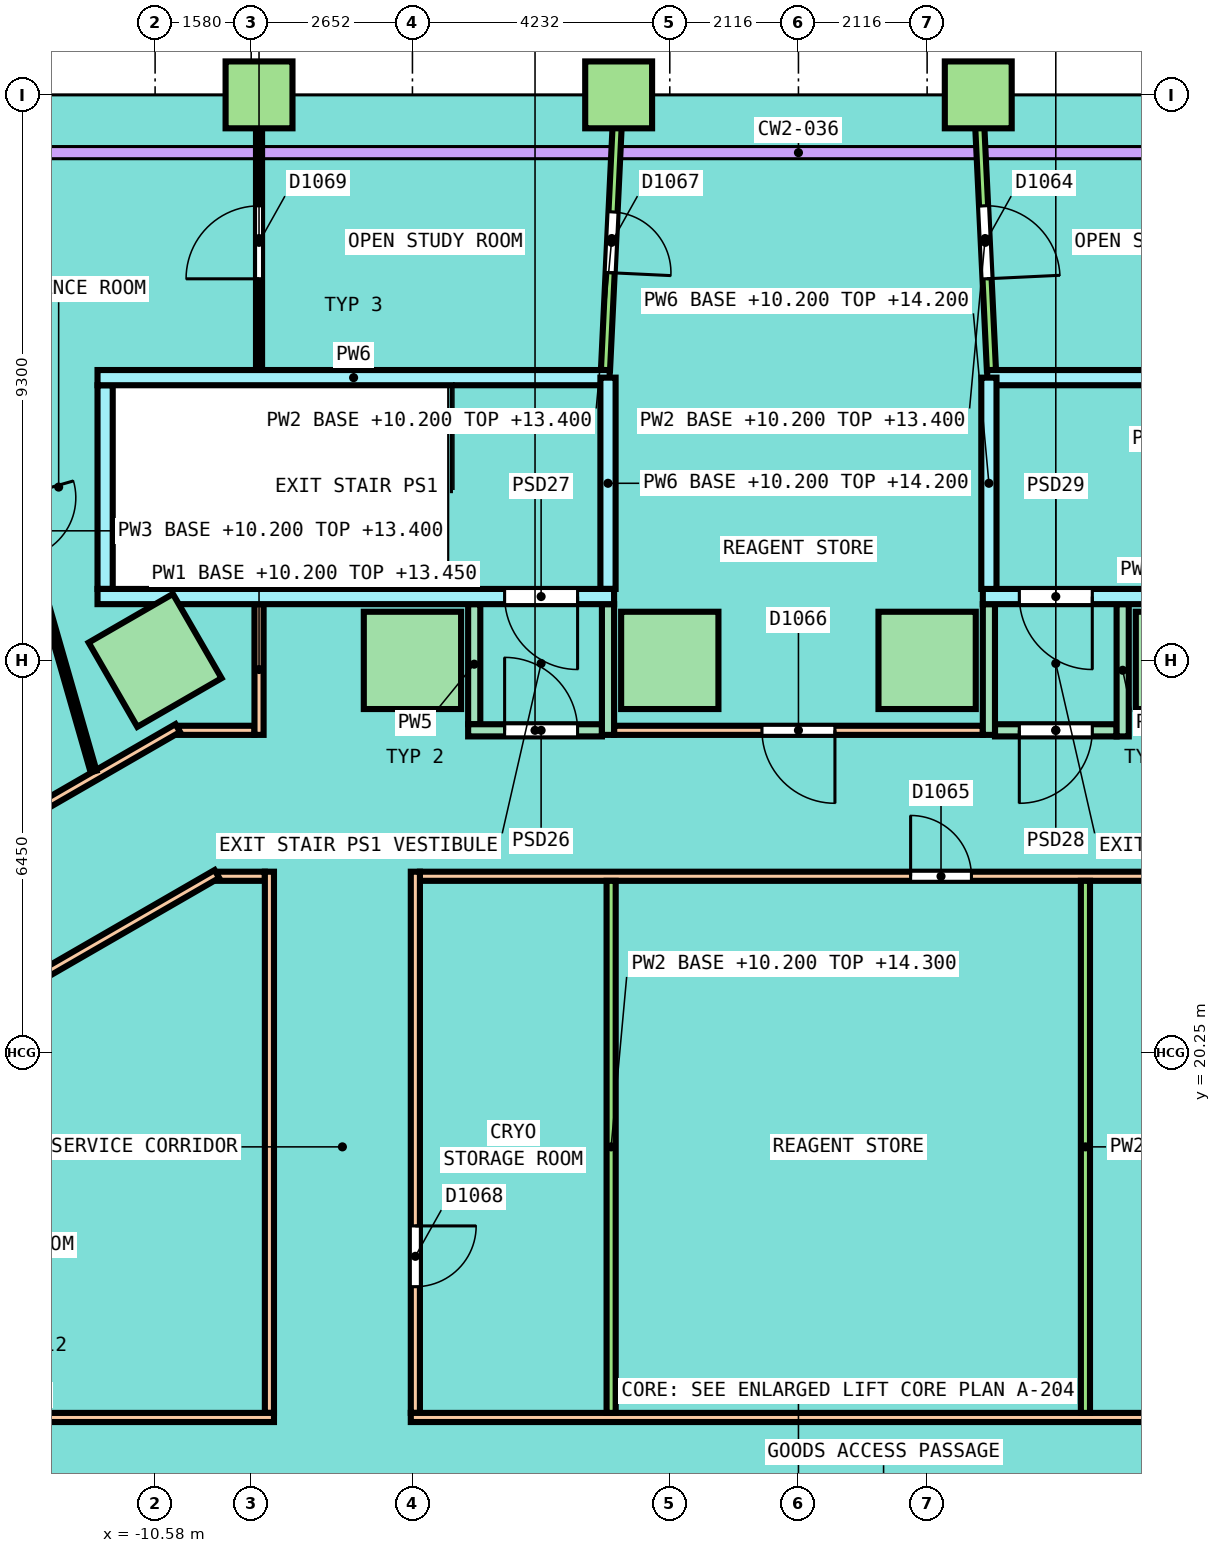
"""IFC4 building model, lengths in metres.
Left out: names, types, materials, properties, quantities, classifications, styles, units other than length and angle.
Written with IfcOpenShell. Run it as: python <this file> out.ifc"""

import sys

from ifc_helpers import new_model, si_unit, direction, frame, frame_2d, origin, origin_2d, place, context, subcontext, project, spatial, rectangle, extrude, element, fill, save


model = new_model("IFC4")
c1 = context("Model", 3, precision=1e-05, world=origin(), true_north=direction((0.0, 1.0)))
c2 = subcontext(c1, "Body", "Model", "MODEL_VIEW")
j1 = project(units=[si_unit("LENGTHUNIT", "METRE"), si_unit("PLANEANGLEUNIT", "RADIAN")], contexts=[c1])
p1 = place(None, origin())
s1 = spatial("IfcSite", under=j1, at=p1, CompositionType="ELEMENT")
p2 = place(p1, origin())
s2 = spatial("IfcBuilding", under=s1, at=p2, CompositionType="ELEMENT")
p3 = place(p2, frame((0.0, 0.0, 10.2)))
s3 = spatial("IfcBuildingStorey", under=s2, at=p3, CompositionType="ELEMENT", Elevation=10.2)
for number, where, z_axis, x_axis in (
    (1, (6.348, 26.7, 0.0), (0.0, 0.0, 1.0), (-1.0, 0.0, 0.0)),
    (2, (2.116, 26.7, 0.0), (0.0, 0.0, 1.0), (-1.0, 0.0, 0.0)),
    (3, (-2.116, 26.7, 0.0), (0.0, 0.0, 1.0), (-1.0, 0.0, 0.0)),
    (4, (-6.348, 26.7, 0.0), (0.0, 0.0, 1.0), (-1.0, 0.0, 0.0)),
    (5, (-10.58, 26.7, 0.0), (0.0, 0.0, 1.0), (-0.866, -0.5, 0.0)),
):
    element("IfcColumn", number, at=place(p3, frame(where, z_axis=z_axis, x_axis=x_axis)), inside=s3, PredefinedType="COLUMN", context=c2, shape_type="SweptSolid", body=[
        extrude(rectangle(XDim=1.6, YDim=1.6, at=origin_2d()), origin(), (0.0, 0.0, 1.0), 4.05),
    ])
for number, where, z_axis, x_axis in (
    (6, (2.957, 36.0, 0.0), (0.0, 0.0, 1.0), (-1.0, 0.0, 0.0)),
    (7, (-2.957, 36.0, 0.0), (0.0, 0.0, 1.0), (-1.0, 0.0, 0.0)),
    (8, (-8.871, 36.0, 0.0), (0.0, 0.0, 1.0), (-1.0, 0.0, 0.0)),
):
    element("IfcColumn", number, at=place(p3, frame(where, z_axis=z_axis, x_axis=x_axis)), inside=s3, PredefinedType="COLUMN", context=c2, shape_type="SweptSolid", body=[
        extrude(rectangle(XDim=1.1, YDim=1.1, at=origin_2d()), origin(), (0.0, 0.0, 1.0), 4.05),
    ])
p4 = place(p3, frame((-9.554, 23.15, 0.0), z_axis=(0.0, 0.0, 1.0), x_axis=(1.0, 0.0, 0.0)))
e9 = element("IfcWall", 9, at=p4, inside=s3, PredefinedType="PARTITIONING", context=c2, shape_type="SweptSolid", body=[
    extrude(rectangle(XDim=0.779, YDim=0.15, at=frame_2d((0.389, 0.0))), origin(), (0.0, 0.0, 1.0), 3.05),
])
p5 = place(p3, frame((-6.225, 23.15, 0.0), z_axis=(0.0, 0.0, 1.0), x_axis=(1.0, 0.0, 0.0)))
e10 = element("IfcWall", 10, at=p5, inside=s3, PredefinedType="PARTITIONING", context=c2, shape_type="SweptSolid", body=[
    extrude(rectangle(XDim=15.929, YDim=0.15, at=frame_2d((7.964, 0.0))), origin(), (0.0, 0.0, 1.0), 3.05),
])
p6 = place(p5, frame((8.07, 0.0, 0.0)))
e11 = element("IfcOpeningElement", 11, at=p6, cuts=e10, PredefinedType="OPENING", context=c2, shape_type="SweptSolid", body=[
    extrude(rectangle(XDim=1.0, YDim=2.1, at=frame_2d((0.5, 1.05))), frame((0.0, 0.085, 0.0), z_axis=(0.0, -1.0, 0.0), x_axis=(1.0, 0.0, 0.0)), (0.0, 0.0, 1.0), 0.17),
])
p7 = place(p3, frame((-10.197, 25.55, 0.0), z_axis=(0.0, 0.0, 1.0), x_axis=(1.0, 0.0, 0.0)))
e12 = element("IfcWall", 12, at=p7, inside=s3, PredefinedType="PARTITIONING", context=c2, shape_type="SweptSolid", body=[
    extrude(rectangle(XDim=1.251, YDim=0.15, at=frame_2d((0.625, 0.0))), origin(), (0.0, 0.0, 1.0), 3.05),
])
p8 = place(p3, frame((-3.032, 25.55, 0.0), z_axis=(0.0, 0.0, 1.0), x_axis=(1.0, 0.0, 0.0)))
e13 = element("IfcWall", 13, at=p8, inside=s3, PredefinedType="PARTITIONING", context=c2, shape_type="SweptSolid", body=[
    extrude(rectangle(XDim=6.064, YDim=0.15, at=frame_2d((3.032, 0.0))), origin(), (0.0, 0.0, 1.0), 3.05),
])
p9 = place(p8, frame((2.432, 0.0, 0.0)))
e14 = element("IfcOpeningElement", 14, at=p9, cuts=e13, PredefinedType="OPENING", context=c2, shape_type="SweptSolid", body=[
    extrude(rectangle(XDim=1.2, YDim=2.1, at=frame_2d((0.6, 1.05))), frame((0.0, 0.085, 0.0), z_axis=(0.0, -1.0, 0.0), x_axis=(1.0, 0.0, 0.0)), (0.0, 0.0, 1.0), 0.17),
])
p10 = place(p3, frame((-16.926, 21.708, 0.0), z_axis=(0.0, 0.0, 1.0), x_axis=(0.866023143435, 0.50000391502, 0.0)))
e15 = element("IfcWall", 15, at=p10, inside=s3, PredefinedType="PARTITIONING", context=c2, shape_type="SweptSolid", body=[
    extrude(rectangle(XDim=7.759, YDim=0.15, at=frame_2d((3.879, 0.0))), origin(), (0.0, 0.0, 1.0), 3.05),
])
p11 = place(p10, frame((2.117, 0.0, 0.0)))
e16 = element("IfcOpeningElement", 16, at=p11, cuts=e15, PredefinedType="OPENING", context=c2, shape_type="SweptSolid", body=[
    extrude(rectangle(XDim=0.9, YDim=2.1, at=frame_2d((0.45, 1.05))), frame((0.0, 0.085, 0.0), z_axis=(0.0, -1.0, 0.0), x_axis=(1.0, 0.0, 0.0)), (0.0, 0.0, 1.0), 0.17),
])
p12 = place(p3, frame((-8.871, 25.475, 0.0), z_axis=(0.0, 0.0, 1.0), x_axis=(0.0, 1.0, 0.0)))
e17 = element("IfcWall", 17, at=p12, inside=s3, PredefinedType="PARTITIONING", context=c2, shape_type="SweptSolid", body=[
    extrude(rectangle(XDim=2.15, YDim=0.15, at=frame_2d((1.075, 0.0))), origin(), (0.0, 0.0, 1.0), 3.25),
])
p13 = place(p3, frame((-15.169, 19.951, 0.0), z_axis=(0.0, 0.0, 1.0), x_axis=(0.866024786089, 0.500001069878, 0.0)))
e18 = element("IfcWall", 18, at=p13, inside=s3, PredefinedType="PARTITIONING", context=c2, shape_type="SweptSolid", body=[
    extrude(rectangle(XDim=6.473, YDim=0.15, at=frame_2d((3.236, 0.0))), origin(), (0.0, 0.0, 1.0), 3.05),
])
p14 = place(p3, frame((-6.3, 14.325, 0.0), z_axis=(0.0, 0.0, 1.0), x_axis=(0.0, 1.0, 0.0)))
e19 = element("IfcWall", 19, at=p14, inside=s3, PredefinedType="PARTITIONING", context=c2, shape_type="SweptSolid", body=[
    extrude(rectangle(XDim=8.9, YDim=0.15, at=frame_2d((4.45, 0.0))), origin(), (0.0, 0.0, 1.0), 3.05),
])
p15 = place(p14, frame((2.075, 0.0, 0.0)))
e20 = element("IfcOpeningElement", 20, at=p15, cuts=e19, PredefinedType="OPENING", context=c2, shape_type="SweptSolid", body=[
    extrude(rectangle(XDim=1.0, YDim=2.1, at=frame_2d((0.5, 1.05))), frame((0.0, 0.085, 0.0), z_axis=(0.0, -1.0, 0.0), x_axis=(1.0, 0.0, 0.0)), (0.0, 0.0, 1.0), 0.17),
])
p16 = place(p3, frame((-8.7, 14.325, 0.0), z_axis=(0.0, 0.0, 1.0), x_axis=(0.0, 1.0, 0.0)))
e21 = element("IfcWall", 21, at=p16, inside=s3, PredefinedType="PARTITIONING", context=c2, shape_type="SweptSolid", body=[
    extrude(rectangle(XDim=8.9, YDim=0.15, at=frame_2d((4.45, 0.0))), origin(), (0.0, 0.0, 1.0), 3.05),
])
p17 = place(p3, frame((-16.575, 14.25, 0.0), z_axis=(0.0, 0.0, 1.0), x_axis=(1.0, 0.0, 0.0)))
e22 = element("IfcWall", 22, at=p17, inside=s3, PredefinedType="PARTITIONING", context=c2, shape_type="SweptSolid", body=[
    extrude(rectangle(XDim=7.95, YDim=0.15, at=frame_2d((3.975, 0.0))), origin(), (0.0, 0.0, 1.0), 3.05),
])
p18 = place(p3, frame((-6.375, 14.25, 0.0), z_axis=(0.0, 0.0, 1.0), x_axis=(1.0, 0.0, 0.0)))
e23 = element("IfcWall", 23, at=p18, inside=s3, PredefinedType="PARTITIONING", context=c2, shape_type="SweptSolid", body=[
    extrude(rectangle(XDim=22.95, YDim=0.15, at=frame_2d((11.475, 0.0))), origin(), (0.0, 0.0, 1.0), 3.05),
])
p19 = place(p18, frame((14.5, 0.0, 0.0)))
e24 = element("IfcOpeningElement", 24, at=p19, cuts=e23, PredefinedType="OPENING", context=c2, shape_type="SweptSolid", body=[
    extrude(rectangle(XDim=1.2, YDim=2.1, at=frame_2d((0.6, 1.05))), frame((0.0, 0.085, 0.0), z_axis=(0.0, -1.0, 0.0), x_axis=(1.0, 0.0, 0.0)), (0.0, 0.0, 1.0), 0.17),
])
p20 = place(p3, frame((-5.332, 25.65, 0.0), z_axis=(0.0, 0.0, 1.0), x_axis=(0.0, 1.0, 0.0)))
e25 = element("IfcWall", 25, at=p20, inside=s3, PredefinedType="PARTITIONING", context=c2, shape_type="SweptSolid", body=[
    extrude(rectangle(XDim=1.975, YDim=0.2, at=frame_2d((0.988, 0.0))), origin(), (0.0, 0.0, 1.0), 3.25),
])
p21 = place(p3, frame((-5.432, 25.55, 0.0), z_axis=(0.0, 0.0, 1.0), x_axis=(1.0, 0.0, 0.0)))
e26 = element("IfcWall", 26, at=p21, inside=s3, PredefinedType="PARTITIONING", context=c2, shape_type="SweptSolid", body=[
    extrude(rectangle(XDim=2.2, YDim=0.2, at=frame_2d((1.1, 0.0))), origin(), (0.0, 0.0, 1.0), 4.05),
])
p22 = place(p21, frame((0.6, 0.0, 0.0)))
e27 = element("IfcOpeningElement", 27, at=p22, cuts=e26, PredefinedType="OPENING", context=c2, shape_type="SweptSolid", body=[
    extrude(rectangle(XDim=1.2, YDim=2.1, at=frame_2d((0.6, 1.05))), frame((0.0, 0.11, 0.0), z_axis=(0.0, -1.0, 0.0), x_axis=(1.0, 0.0, 0.0)), (0.0, 0.0, 1.0), 0.22),
])
p23 = place(p3, frame((3.232, 25.55, 0.0), z_axis=(0.0, 0.0, 1.0), x_axis=(1.0, 0.0, 0.0)))
e28 = element("IfcWall", 28, at=p23, inside=s3, PredefinedType="PARTITIONING", context=c2, shape_type="SweptSolid", body=[
    extrude(rectangle(XDim=2.0, YDim=0.2, at=frame_2d((1.0, 0.0))), origin(), (0.0, 0.0, 1.0), 4.05),
])
p24 = place(p23, frame((0.4, 0.0, 0.0)))
e29 = element("IfcOpeningElement", 29, at=p24, cuts=e28, PredefinedType="OPENING", context=c2, shape_type="SweptSolid", body=[
    extrude(rectangle(XDim=1.2, YDim=2.1, at=frame_2d((0.6, 1.05))), frame((0.0, 0.11, 0.0), z_axis=(0.0, -1.0, 0.0), x_axis=(1.0, 0.0, 0.0)), (0.0, 0.0, 1.0), 0.22),
])
p25 = place(p3, frame((5.332, 25.45, 0.0), z_axis=(0.0, 0.0, 1.0), x_axis=(0.0, 1.0, 0.0)))
e30 = element("IfcWall", 30, at=p25, inside=s3, PredefinedType="PARTITIONING", context=c2, shape_type="SweptSolid", body=[
    extrude(rectangle(XDim=2.175, YDim=0.2, at=frame_2d((1.087, 0.0))), origin(), (0.0, 0.0, 1.0), 3.25),
])
for number, where, z_axis, x_axis in (
    (31, (-3.132, 25.475, 0.0), (0.0, 0.0, 1.0), (0.0, 1.0, 0.0)),
    (32, (3.132, 25.475, 0.0), (0.0, 0.0, 1.0), (0.0, 1.0, 0.0)),
):
    element("IfcWall", number, at=place(p3, frame(where, z_axis=z_axis, x_axis=x_axis)), inside=s3, PredefinedType="PARTITIONING", context=c2, shape_type="SweptSolid", body=[
        extrude(rectangle(XDim=2.15, YDim=0.2, at=frame_2d((1.075, 0.0))), origin(), (0.0, 0.0, 1.0), 3.25),
    ])
p26 = place(p3, frame((4.719, 14.325, 0.0), z_axis=(0.0, 0.0, 1.0), x_axis=(0.0, 1.0, 0.0)))
e33 = element("IfcWall", 33, at=p26, inside=s3, PredefinedType="PARTITIONING", context=c2, shape_type="SweptSolid", body=[
    extrude(rectangle(XDim=8.75, YDim=0.15, at=frame_2d((4.375, 0.0))), origin(), (0.0, 0.0, 1.0), 3.05),
])
p27 = place(p3, frame((2.967, 35.8, 0.0), z_axis=(0.0, 0.0, 1.0), x_axis=(0.047755341285, -0.998859062821, 0.0)))
e34 = element("IfcWall", 34, at=p27, inside=s3, PredefinedType="PARTITIONING", context=c2, shape_type="SweptSolid", body=[
    extrude(rectangle(XDim=4.33, YDim=0.15, at=frame_2d((2.165, 0.0))), origin(), (0.0, 0.0, 1.0), 3.2),
])
p28 = place(p27, frame((1.627, 0.0, 0.0)))
e35 = element("IfcOpeningElement", 35, at=p28, cuts=e34, PredefinedType="OPENING", context=c2, shape_type="SweptSolid", body=[
    extrude(rectangle(XDim=1.2, YDim=2.1, at=frame_2d((0.6, 1.05))), frame((0.0, 0.085, 0.0), z_axis=(0.0, -1.0, 0.0), x_axis=(1.0, 0.0, 0.0)), (0.0, 0.0, 1.0), 0.17),
])
p29 = place(p3, frame((-3.081, 14.325, 0.0), z_axis=(0.0, 0.0, 1.0), x_axis=(0.0, 1.0, 0.0)))
e36 = element("IfcWall", 36, at=p29, inside=s3, PredefinedType="PARTITIONING", context=c2, shape_type="SweptSolid", body=[
    extrude(rectangle(XDim=8.75, YDim=0.15, at=frame_2d((4.375, 0.0))), origin(), (0.0, 0.0, 1.0), 4.1),
])
p30 = place(p3, frame((-3.173, 31.475, 0.0), z_axis=(0.0, 0.0, 1.0), x_axis=(0.047755341285, 0.998859062821, 0.0)))
e37 = element("IfcWall", 37, at=p30, inside=s3, PredefinedType="PARTITIONING", context=c2, shape_type="SweptSolid", body=[
    extrude(rectangle(XDim=4.33, YDim=0.15, at=frame_2d((2.165, 0.0))), origin(), (0.0, 0.0, 1.0), 3.2),
])
p31 = place(p30, frame((1.603, 0.0, 0.0)))
e38 = element("IfcOpeningElement", 38, at=p31, cuts=e37, PredefinedType="OPENING", context=c2, shape_type="SweptSolid", body=[
    extrude(rectangle(XDim=1.0, YDim=2.1, at=frame_2d((0.5, 1.05))), frame((0.0, 0.085, 0.0), z_axis=(0.0, -1.0, 0.0), x_axis=(1.0, 0.0, 0.0)), (0.0, 0.0, 1.0), 0.17),
])
p32 = place(p3, frame((-8.871, 31.475, 0.0), z_axis=(0.0, 0.0, 1.0), x_axis=(0.0, 1.0, 0.0)))
e39 = element("IfcWall", 39, at=p32, inside=s3, PredefinedType="PARTITIONING", context=c2, shape_type="SweptSolid", body=[
    extrude(rectangle(XDim=4.325, YDim=0.1, at=frame_2d((2.163, 0.0))), origin(), (0.0, 0.0, 1.0), 4.0),
])
p33 = place(p32, frame((1.5, 0.0, 0.0)))
e40 = element("IfcOpeningElement", 40, at=p33, cuts=e39, PredefinedType="OPENING", context=c2, shape_type="SweptSolid", body=[
    extrude(rectangle(XDim=1.2, YDim=2.1, at=frame_2d((0.6, 1.05))), frame((0.0, 0.06, 0.0), z_axis=(0.0, -1.0, 0.0), x_axis=(1.0, 0.0, 0.0)), (0.0, 0.0, 1.0), 0.12),
])
p34 = place(p3, frame((-14.727, 35.8, 0.0), z_axis=(0.0, 0.0, 1.0), x_axis=(0.27581573325, -0.96121052912, 0.0)))
e41 = element("IfcWall", 41, at=p34, inside=s3, PredefinedType="PARTITIONING", context=c2, shape_type="SweptSolid", body=[
    extrude(rectangle(XDim=11.369, YDim=0.1, at=frame_2d((5.685, 0.0))), origin(), (0.0, 0.0, 1.0), 3.25),
])
p35 = place(p34, frame((6.684, 0.0, 0.0)))
e42 = element("IfcOpeningElement", 42, at=p35, cuts=e41, PredefinedType="OPENING", context=c2, shape_type="SweptSolid", body=[
    extrude(rectangle(XDim=1.0, YDim=2.1, at=frame_2d((0.5, 1.05))), frame((0.0, 0.06, 0.0), z_axis=(0.0, -1.0, 0.0), x_axis=(1.0, 0.0, 0.0)), (0.0, 0.0, 1.0), 0.12),
])
p36 = place(p3, frame((-11.402, 27.875, 0.0), z_axis=(0.0, 0.0, 1.0), x_axis=(0.0, 1.0, 0.0)))
e43 = element("IfcWall", 43, at=p36, inside=s3, PredefinedType="SOLIDWALL", context=c2, shape_type="SweptSolid", body=[
    extrude(rectangle(XDim=3.35, YDim=0.25, at=frame_2d((1.675, 0.0))), origin(), (0.0, 0.0, 1.0), 3.2),
])
for number, where, z_axis, x_axis in (
    (44, (-11.527, 31.35, 0.0), (0.0, 0.0, 1.0), (1.0, 0.0, 0.0)),
    (45, (3.104, 31.35, 0.0), (0.0, 0.0, 1.0), (1.0, 0.0, 0.0)),
):
    element("IfcWall", number, at=place(p3, frame(where, z_axis=z_axis, x_axis=x_axis)), inside=s3, PredefinedType="SOLIDWALL", context=c2, shape_type="SweptSolid", body=[
        extrude(rectangle(XDim=8.422, YDim=0.25, at=frame_2d((4.211, 0.0))), origin(), (0.0, 0.0, 1.0), 3.2),
    ])
p37 = place(p3, frame((-3.132, 27.875, 0.0), z_axis=(0.0, 0.0, 1.0), x_axis=(0.0, 1.0, 0.0)))
e46 = element("IfcWall", 46, at=p37, inside=s3, PredefinedType="SOLIDWALL", context=c2, shape_type="SweptSolid", body=[
    extrude(rectangle(XDim=3.475, YDim=0.25, at=frame_2d((1.738, 0.0))), origin(), (0.0, 0.0, 1.0), 4.0),
])
p38 = place(p3, frame((-11.527, 27.75, 0.0), z_axis=(0.0, 0.0, 1.0), x_axis=(1.0, 0.0, 0.0)))
e47 = element("IfcWall", 47, at=p38, inside=s3, PredefinedType="SOLIDWALL", context=c2, shape_type="SweptSolid", body=[
    extrude(rectangle(XDim=8.495, YDim=0.25, at=frame_2d((4.248, 0.0))), origin(), (0.0, 0.0, 1.0), 3.2),
])
p39 = place(p38, frame((6.695, 0.0, 0.0)))
e48 = element("IfcOpeningElement", 48, at=p39, cuts=e47, PredefinedType="OPENING", context=c2, shape_type="SweptSolid", body=[
    extrude(rectangle(XDim=1.2, YDim=2.1, at=frame_2d((0.6, 1.05))), frame((0.0, 0.135, 0.0), z_axis=(0.0, -1.0, 0.0), x_axis=(1.0, 0.0, 0.0)), (0.0, 0.0, 1.0), 0.27),
])
p40 = place(p3, frame((3.032, 27.75, 0.0), z_axis=(0.0, 0.0, 1.0), x_axis=(1.0, 0.0, 0.0)))
e49 = element("IfcWall", 49, at=p40, inside=s3, PredefinedType="SOLIDWALL", context=c2, shape_type="SweptSolid", body=[
    extrude(rectangle(XDim=8.495, YDim=0.25, at=frame_2d((4.248, 0.0))), origin(), (0.0, 0.0, 1.0), 3.2),
])
p41 = place(p40, frame((0.6, 0.0, 0.0)))
e50 = element("IfcOpeningElement", 50, at=p41, cuts=e49, PredefinedType="OPENING", context=c2, shape_type="SweptSolid", body=[
    extrude(rectangle(XDim=1.2, YDim=2.1, at=frame_2d((0.6, 1.05))), frame((0.0, 0.135, 0.0), z_axis=(0.0, -1.0, 0.0), x_axis=(1.0, 0.0, 0.0)), (0.0, 0.0, 1.0), 0.27),
])
p42 = place(p3, frame((3.132, 27.875, 0.0), z_axis=(0.0, 0.0, 1.0), x_axis=(0.0, 1.0, 0.0)))
e51 = element("IfcWall", 51, at=p42, inside=s3, PredefinedType="SOLIDWALL", context=c2, shape_type="SweptSolid", body=[
    extrude(rectangle(XDim=3.475, YDim=0.25, at=frame_2d((1.738, 0.0))), origin(), (0.0, 0.0, 1.0), 4.0),
])
p43 = place(p28, origin())
e52 = element("IfcDoor", 52, at=p43, inside=s3, OperationType="DOUBLE_DOOR_SINGLE_SWING", PredefinedType="DOOR", context=c2, shape_type="SweptSolid", body=[
    extrude(rectangle(XDim=1.2, YDim=2.1, at=frame_2d((0.6, 1.05))), frame((0.0, 0.025, 0.0), z_axis=(0.0, -1.0, 0.0), x_axis=(1.0, 0.0, 0.0)), (0.0, 0.0, 1.0), 0.05),
])
fill(e35, e52)
p44 = place(p6, origin())
e53 = element("IfcDoor", 53, at=p44, inside=s3, OperationType="SINGLE_SWING_RIGHT", PredefinedType="DOOR", context=c2, shape_type="SweptSolid", body=[
    extrude(rectangle(XDim=1.0, YDim=2.1, at=frame_2d((0.5, 1.05))), frame((0.0, 0.025, 0.0), z_axis=(0.0, -1.0, 0.0), x_axis=(1.0, 0.0, 0.0)), (0.0, 0.0, 1.0), 0.05),
])
fill(e11, e53)
p45 = place(p9, origin())
e54 = element("IfcDoor", 54, at=p45, inside=s3, OperationType="DOUBLE_DOOR_SINGLE_SWING", PredefinedType="DOOR", context=c2, shape_type="SweptSolid", body=[
    extrude(rectangle(XDim=1.2, YDim=2.1, at=frame_2d((0.6, 1.05))), frame((0.0, 0.025, 0.0), z_axis=(0.0, -1.0, 0.0), x_axis=(1.0, 0.0, 0.0)), (0.0, 0.0, 1.0), 0.05),
])
fill(e14, e54)
p46 = place(p31, origin())
e55 = element("IfcDoor", 55, at=p46, inside=s3, OperationType="SINGLE_SWING_LEFT", PredefinedType="DOOR", context=c2, shape_type="SweptSolid", body=[
    extrude(rectangle(XDim=1.0, YDim=2.1, at=frame_2d((0.5, 1.05))), frame((0.0, 0.025, 0.0), z_axis=(0.0, -1.0, 0.0), x_axis=(1.0, 0.0, 0.0)), (0.0, 0.0, 1.0), 0.05),
])
fill(e38, e55)
p47 = place(p15, origin())
e56 = element("IfcDoor", 56, at=p47, inside=s3, OperationType="SINGLE_SWING_RIGHT", PredefinedType="DOOR", context=c2, shape_type="SweptSolid", body=[
    extrude(rectangle(XDim=1.0, YDim=2.1, at=frame_2d((0.5, 1.05))), frame((0.0, 0.025, 0.0), z_axis=(0.0, -1.0, 0.0), x_axis=(1.0, 0.0, 0.0)), (0.0, 0.0, 1.0), 0.05),
])
fill(e20, e56)
p48 = place(p33, origin())
e57 = element("IfcDoor", 57, at=p48, inside=s3, OperationType="DOUBLE_DOOR_SINGLE_SWING", PredefinedType="DOOR", context=c2, shape_type="SweptSolid", body=[
    extrude(rectangle(XDim=1.2, YDim=2.1, at=frame_2d((0.6, 1.05))), frame((0.0, 0.025, 0.0), z_axis=(0.0, -1.0, 0.0), x_axis=(1.0, 0.0, 0.0)), (0.0, 0.0, 1.0), 0.05),
])
fill(e40, e57)
p49 = place(p22, origin())
e58 = element("IfcDoor", 58, at=p49, inside=s3, OperationType="SINGLE_SWING_LEFT", PredefinedType="DOOR", context=c2, shape_type="SweptSolid", body=[
    extrude(rectangle(XDim=1.2, YDim=2.1, at=frame_2d((0.6, 1.05))), frame((0.0, 0.025, 0.0), z_axis=(0.0, -1.0, 0.0), x_axis=(1.0, 0.0, 0.0)), (0.0, 0.0, 1.0), 0.05),
])
fill(e27, e58)
p50 = place(p39, origin())
e59 = element("IfcDoor", 59, at=p50, inside=s3, OperationType="SINGLE_SWING_RIGHT", PredefinedType="DOOR", context=c2, shape_type="SweptSolid", body=[
    extrude(rectangle(XDim=1.2, YDim=2.1, at=frame_2d((0.6, 1.05))), frame((0.0, 0.025, 0.0), z_axis=(0.0, -1.0, 0.0), x_axis=(1.0, 0.0, 0.0)), (0.0, 0.0, 1.0), 0.05),
])
fill(e48, e59)
p51 = place(p24, origin())
e60 = element("IfcDoor", 60, at=p51, inside=s3, OperationType="SINGLE_SWING_LEFT", PredefinedType="DOOR", context=c2, shape_type="SweptSolid", body=[
    extrude(rectangle(XDim=1.2, YDim=2.1, at=frame_2d((0.6, 1.05))), frame((0.0, 0.025, 0.0), z_axis=(0.0, -1.0, 0.0), x_axis=(1.0, 0.0, 0.0)), (0.0, 0.0, 1.0), 0.05),
])
fill(e29, e60)
p52 = place(p41, origin())
e61 = element("IfcDoor", 61, at=p52, inside=s3, OperationType="SINGLE_SWING_RIGHT", PredefinedType="DOOR", context=c2, shape_type="SweptSolid", body=[
    extrude(rectangle(XDim=1.2, YDim=2.1, at=frame_2d((0.6, 1.05))), frame((0.0, 0.025, 0.0), z_axis=(0.0, -1.0, 0.0), x_axis=(1.0, 0.0, 0.0)), (0.0, 0.0, 1.0), 0.05),
])
fill(e50, e61)
save(model, sys.argv[1])
